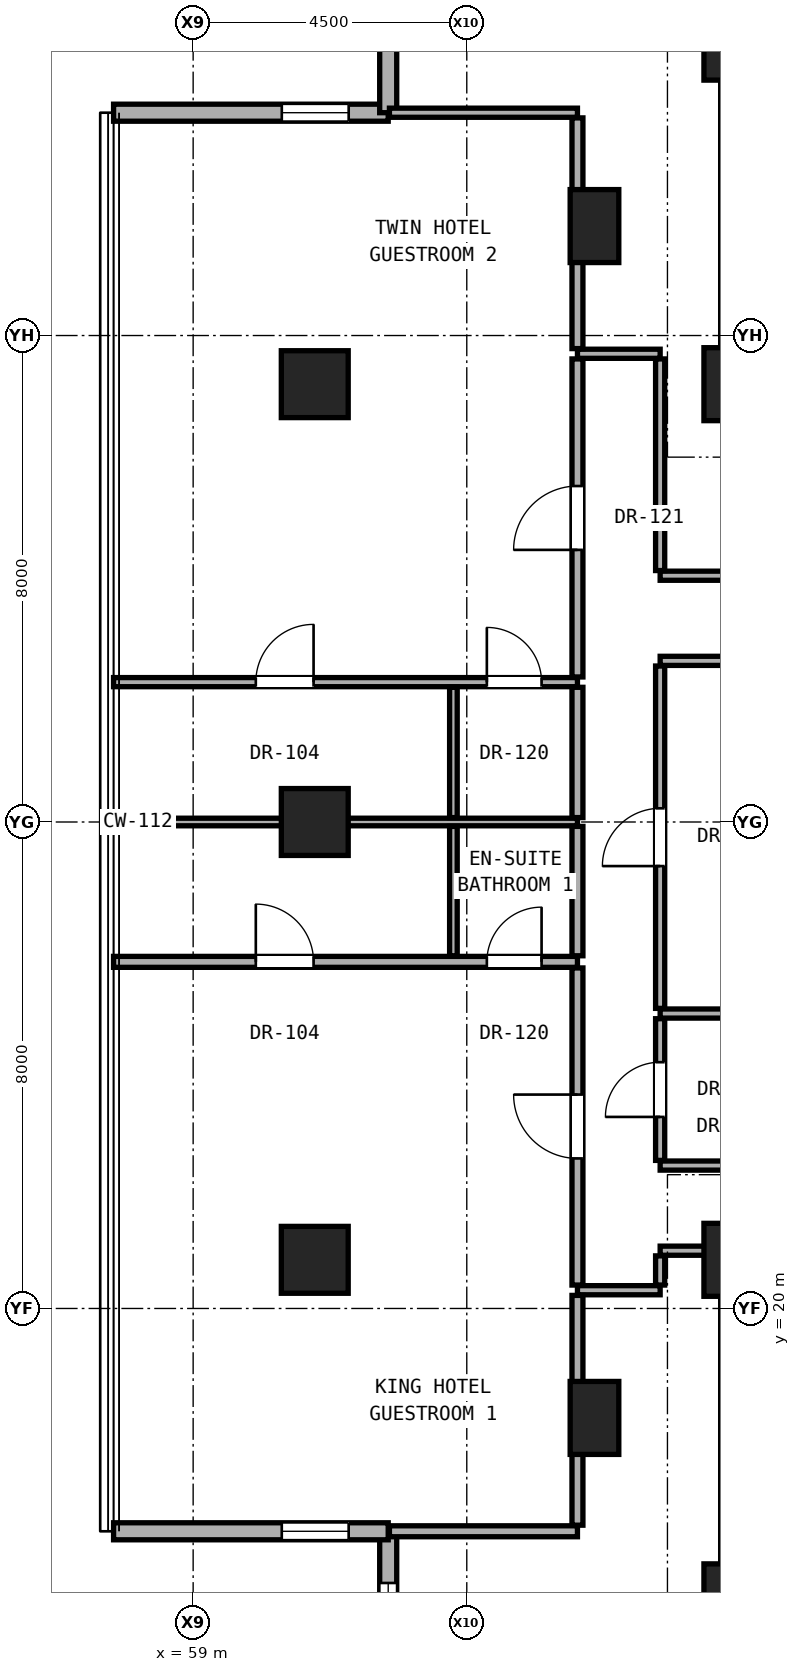
"""IFC4 building model, lengths in metres.
Left out: names, types, materials, properties, quantities, classifications, styles, units other than length and angle.
Written with IfcOpenShell. Run it as: python <this file> out.ifc"""

import sys

from ifc_helpers import new_model, si_unit, direction, frame, frame_2d, origin, origin_2d, place, context, subcontext, project, spatial, rectangle, hollow_rectangle, extrude, element, fill, save


model = new_model("IFC4")
c1 = context("Model", 3, precision=1e-05, world=origin(), true_north=direction((0.0, 1.0)))
c2 = subcontext(c1, "Body", "Model", "MODEL_VIEW")
j1 = project(units=[si_unit("LENGTHUNIT", "METRE"), si_unit("PLANEANGLEUNIT", "RADIAN")], contexts=[c1])
p1 = place(None, origin())
s1 = spatial("IfcSite", under=j1, at=p1, CompositionType="ELEMENT")
p2 = place(p1, origin())
s2 = spatial("IfcBuilding", under=s1, at=p2, CompositionType="ELEMENT")
p3 = place(p2, frame((0.0, 0.0, 111.5)))
s3 = spatial("IfcBuildingStorey", under=s2, at=p3, CompositionType="ELEMENT", Elevation=111.5)
for number, where, z_axis, x_axis in (
    (1, (68.0, 15.2, 0.0), (0.0, 0.0, 1.0), (1.0, 0.0, 0.0)),
    (2, (68.0, 20.8, 0.0), (0.0, 0.0, 1.0), (1.0, 0.0, 0.0)),
    (3, (68.0, 35.2, 0.0), (0.0, 0.0, 1.0), (1.0, 0.0, 0.0)),
    (4, (68.0, 40.8, 0.0), (0.0, 0.0, 1.0), (1.0, 0.0, 0.0)),
):
    element("IfcColumn", number, at=place(p3, frame(where, z_axis=z_axis, x_axis=x_axis)), inside=s3, PredefinedType="COLUMN", context=c2, shape_type="SweptSolid", body=[
        extrude(rectangle(XDim=1.2, YDim=1.2, at=origin_2d()), origin(), (0.0, 0.0, 1.0), 3.3),
    ])
for number, where, z_axis, x_axis in (
    (5, (61.0, 20.8, 0.0), (0.0, 0.0, 1.0), (1.0, 0.0, 0.0)),
    (6, (61.0, 28.0, 0.0), (0.0, 0.0, 1.0), (1.0, 0.0, 0.0)),
    (7, (61.0, 35.2, 0.0), (0.0, 0.0, 1.0), (1.0, 0.0, 0.0)),
):
    element("IfcColumn", number, at=place(p3, frame(where, z_axis=z_axis, x_axis=x_axis)), inside=s3, PredefinedType="COLUMN", context=c2, shape_type="SweptSolid", body=[
        extrude(hollow_rectangle(XDim=1.1, YDim=1.1, WallThickness=0.06, at=origin_2d()), origin(), (0.0, 0.0, 1.0), 3.3),
    ])
for number, where, z_axis, x_axis in (
    (8, (65.6, 18.2, 0.0), (0.0, 0.0, 1.0), (1.0, 0.0, 0.0)),
    (9, (65.6, 37.8, 0.0), (0.0, 0.0, 1.0), (1.0, 0.0, 0.0)),
):
    element("IfcColumn", number, at=place(p3, frame(where, z_axis=z_axis, x_axis=x_axis)), inside=s3, PredefinedType="PILASTER", context=c2, shape_type="SweptSolid", body=[
        extrude(rectangle(XDim=0.8, YDim=1.2, at=origin_2d()), origin(), (0.0, 0.0, 1.0), 3.3),
    ])
for number, where, z_axis, x_axis in (
    (10, (68.0, 35.2, 0.0), (0.0, 0.0, 1.0), (0.0, 1.0, 0.0)),
    (11, (68.0, 15.2, 0.0), (0.0, 0.0, 1.0), (0.0, 1.0, 0.0)),
):
    element("IfcWall", number, at=place(p3, frame(where, z_axis=z_axis, x_axis=x_axis)), inside=s3, PredefinedType="SHEAR", context=c2, shape_type="SweptSolid", body=[
        extrude(rectangle(XDim=5.6, YDim=0.65, at=frame_2d((2.8, 0.0))), origin(), (0.0, 0.0, 1.0), 3.08),
    ])
p4 = place(p3, frame((62.208, 16.336, 0.0), z_axis=(0.0, 0.0, 1.0), x_axis=(0.0, -1.0, 0.0)))
e12 = element("IfcWall", 12, at=p4, inside=s3, PredefinedType="SOLIDWALL", context=c2, shape_type="SweptSolid", body=[
    extrude(rectangle(XDim=4.516, YDim=0.28, at=frame_2d((2.258, 0.0))), origin(), (0.0, 0.0, 1.0), 3.06),
])
p5 = place(p4, frame((0.85, 0.0, 0.81)))
e13 = element("IfcOpeningElement", 13, at=p5, cuts=e12, PredefinedType="OPENING", context=c2, shape_type="SweptSolid", body=[
    extrude(rectangle(XDim=1.5, YDim=2.1, at=frame_2d((0.75, 1.05))), frame((0.0, 0.15, 0.0), z_axis=(0.0, -1.0, 0.0), x_axis=(1.0, 0.0, 0.0)), (0.0, 0.0, 1.0), 0.3),
])
p6 = place(p3, frame((57.691, 16.336, 0.0), z_axis=(0.0, 0.0, 1.0), x_axis=(1.0, 0.0, 0.0)))
e14 = element("IfcWall", 14, at=p6, inside=s3, PredefinedType="SOLIDWALL", context=c2, shape_type="SweptSolid", body=[
    extrude(rectangle(XDim=4.516, YDim=0.28, at=frame_2d((2.258, 0.0))), origin(), (0.0, 0.0, 1.0), 3.06),
])
p7 = place(p6, frame((2.766, 0.0, 0.85)))
e15 = element("IfcOpeningElement", 15, at=p7, cuts=e14, PredefinedType="OPENING", context=c2, shape_type="SweptSolid", body=[
    extrude(rectangle(XDim=1.1, YDim=2.0, at=frame_2d((0.55, 1.0))), frame((0.0, 0.15, 0.0), z_axis=(0.0, -1.0, 0.0), x_axis=(1.0, 0.0, 0.0)), (0.0, 0.0, 1.0), 0.3),
])
p8 = place(p3, frame((62.208, 39.664, 0.0), z_axis=(0.0, 0.0, 1.0), x_axis=(-1.0, 0.0, 0.0)))
e16 = element("IfcWall", 16, at=p8, inside=s3, PredefinedType="SOLIDWALL", context=c2, shape_type="SweptSolid", body=[
    extrude(rectangle(XDim=4.516, YDim=0.28, at=frame_2d((2.258, 0.0))), origin(), (0.0, 0.0, 1.0), 3.06),
])
p9 = place(p8, frame((0.65, 0.0, 0.85)))
e17 = element("IfcOpeningElement", 17, at=p9, cuts=e16, PredefinedType="OPENING", context=c2, shape_type="SweptSolid", body=[
    extrude(rectangle(XDim=1.1, YDim=2.0, at=frame_2d((0.55, 1.0))), frame((0.0, 0.15, 0.0), z_axis=(0.0, -1.0, 0.0), x_axis=(1.0, 0.0, 0.0)), (0.0, 0.0, 1.0), 0.3),
])
p10 = place(p3, frame((62.208, 44.181, 0.0), z_axis=(0.0, 0.0, 1.0), x_axis=(0.0, -1.0, 0.0)))
e18 = element("IfcWall", 18, at=p10, inside=s3, PredefinedType="SOLIDWALL", context=c2, shape_type="SweptSolid", body=[
    extrude(rectangle(XDim=4.516, YDim=0.28, at=frame_2d((2.258, 0.0))), origin(), (0.0, 0.0, 1.0), 3.06),
])
p11 = place(p3, frame((62.228, 16.336, 0.0), z_axis=(0.0, 0.0, 1.0), x_axis=(1.0, 0.0, 0.0)))
e19 = element("IfcWall", 19, at=p11, inside=s3, PredefinedType="PARTITIONING", context=c2, shape_type="SweptSolid", body=[
    extrude(rectangle(XDim=3.092, YDim=0.18, at=frame_2d((1.546, 0.0))), origin(), (0.0, 0.0, 1.0), 3.08),
])
p12 = place(p3, frame((65.32, 20.3, 0.0), z_axis=(0.0, 0.0, 1.0), x_axis=(1.0, 0.0, 0.0)))
e20 = element("IfcWall", 20, at=p12, inside=s3, PredefinedType="PARTITIONING", context=c2, shape_type="SweptSolid", body=[
    extrude(rectangle(XDim=1.36, YDim=0.15, at=frame_2d((0.68, 0.0))), origin(), (0.0, 0.0, 1.0), 3.08),
])
p13 = place(p3, frame((66.68, 20.95, 0.0), z_axis=(0.0, 0.0, 1.0), x_axis=(1.0, 0.0, 0.0)))
e21 = element("IfcWall", 21, at=p13, inside=s3, PredefinedType="PARTITIONING", context=c2, shape_type="SweptSolid", body=[
    extrude(rectangle(XDim=1.0, YDim=0.15, at=frame_2d((0.5, 0.0))), origin(), (0.0, 0.0, 1.0), 2.472),
])
p14 = place(p3, frame((66.68, 22.35, 0.0), z_axis=(0.0, 0.0, 1.0), x_axis=(1.0, 0.0, 0.0)))
e22 = element("IfcWall", 22, at=p14, inside=s3, PredefinedType="PARTITIONING", context=c2, shape_type="SweptSolid", body=[
    extrude(rectangle(XDim=19.5, YDim=0.15, at=frame_2d((9.75, 0.0))), origin(), (0.0, 0.0, 1.0), 2.145),
])
p15 = place(p14, frame((8.053, 0.0, 0.0)))
e23 = element("IfcOpeningElement", 23, at=p15, cuts=e22, PredefinedType="OPENING", context=c2, shape_type="SweptSolid", body=[
    extrude(rectangle(XDim=0.85, YDim=2.01, at=frame_2d((0.425, 1.005))), frame((0.0, 0.085, 0.0), z_axis=(0.0, -1.0, 0.0), x_axis=(1.0, 0.0, 0.0)), (0.0, 0.0, 1.0), 0.17),
])
p16 = place(p3, frame((66.68, 24.85, 0.0), z_axis=(0.0, 0.0, 1.0), x_axis=(1.0, 0.0, 0.0)))
e24 = element("IfcWall", 24, at=p16, inside=s3, PredefinedType="PARTITIONING", context=c2, shape_type="SweptSolid", body=[
    extrude(rectangle(XDim=3.07, YDim=0.15, at=frame_2d((1.535, 0.0))), origin(), (0.0, 0.0, 1.0), 2.145),
])
p17 = place(p3, frame((57.691, 25.7, 0.0), z_axis=(0.0, 0.0, 1.0), x_axis=(1.0, 0.0, 0.0)))
e25 = element("IfcWall", 25, at=p17, inside=s3, PredefinedType="PARTITIONING", context=c2, shape_type="SweptSolid", body=[
    extrude(rectangle(XDim=7.629, YDim=0.18, at=frame_2d((3.814, 0.0))), origin(), (0.0, 0.0, 1.0), 2.216),
])
p18 = place(p17, frame((2.34, 0.0, 0.0)))
e26 = element("IfcOpeningElement", 26, at=p18, cuts=e25, PredefinedType="OPENING", context=c2, shape_type="SweptSolid", body=[
    extrude(rectangle(XDim=0.95, YDim=2.15, at=frame_2d((0.475, 1.075))), frame((0.0, 0.1, 0.0), z_axis=(0.0, -1.0, 0.0), x_axis=(1.0, 0.0, 0.0)), (0.0, 0.0, 1.0), 0.2),
])
p19 = place(p17, frame((6.139, 0.0, 0.0)))
e27 = element("IfcOpeningElement", 27, at=p19, cuts=e25, PredefinedType="OPENING", context=c2, shape_type="SweptSolid", body=[
    extrude(rectangle(XDim=0.9, YDim=2.1, at=frame_2d((0.45, 1.05))), frame((0.0, 0.1, 0.0), z_axis=(0.0, -1.0, 0.0), x_axis=(1.0, 0.0, 0.0)), (0.0, 0.0, 1.0), 0.2),
])
p20 = place(p3, frame((57.691, 28.0, 0.0), z_axis=(0.0, 0.0, 1.0), x_axis=(1.0, 0.0, 0.0)))
e28 = element("IfcWall", 28, at=p20, inside=s3, PredefinedType="PARTITIONING", context=c2, shape_type="SweptSolid", body=[
    extrude(rectangle(XDim=7.629, YDim=0.125, at=frame_2d((3.814, 0.0))), origin(), (0.0, 0.0, 1.0), 2.216),
])
p21 = place(p3, frame((57.691, 30.3, 0.0), z_axis=(0.0, 0.0, 1.0), x_axis=(1.0, 0.0, 0.0)))
e29 = element("IfcWall", 29, at=p21, inside=s3, PredefinedType="PARTITIONING", context=c2, shape_type="SweptSolid", body=[
    extrude(rectangle(XDim=7.629, YDim=0.15, at=frame_2d((3.814, 0.0))), origin(), (0.0, 0.0, 1.0), 2.216),
])
p22 = place(p21, frame((2.34, 0.0, 0.0)))
e30 = element("IfcOpeningElement", 30, at=p22, cuts=e29, PredefinedType="OPENING", context=c2, shape_type="SweptSolid", body=[
    extrude(rectangle(XDim=0.95, YDim=2.15, at=frame_2d((0.475, 1.075))), frame((0.0, 0.085, 0.0), z_axis=(0.0, -1.0, 0.0), x_axis=(1.0, 0.0, 0.0)), (0.0, 0.0, 1.0), 0.17),
])
p23 = place(p21, frame((6.139, 0.0, 0.0)))
e31 = element("IfcOpeningElement", 31, at=p23, cuts=e29, PredefinedType="OPENING", context=c2, shape_type="SweptSolid", body=[
    extrude(rectangle(XDim=0.9, YDim=2.1, at=frame_2d((0.45, 1.05))), frame((0.0, 0.085, 0.0), z_axis=(0.0, -1.0, 0.0), x_axis=(1.0, 0.0, 0.0)), (0.0, 0.0, 1.0), 0.17),
])
p24 = place(p3, frame((66.68, 30.65, 0.0), z_axis=(0.0, 0.0, 1.0), x_axis=(1.0, 0.0, 0.0)))
e32 = element("IfcWall", 32, at=p24, inside=s3, PredefinedType="PARTITIONING", context=c2, shape_type="SweptSolid", body=[
    extrude(rectangle(XDim=19.5, YDim=0.15, at=frame_2d((9.75, 0.0))), origin(), (0.0, 0.0, 1.0), 2.145),
])
p25 = place(p24, frame((3.795, 0.0, 0.0)))
e33 = element("IfcOpeningElement", 33, at=p25, cuts=e32, PredefinedType="OPENING", context=c2, shape_type="SweptSolid", body=[
    extrude(rectangle(XDim=0.85, YDim=2.01, at=frame_2d((0.425, 1.005))), frame((0.0, 0.085, 0.0), z_axis=(0.0, -1.0, 0.0), x_axis=(1.0, 0.0, 0.0)), (0.0, 0.0, 1.0), 0.17),
])
p26 = place(p24, frame((15.098, 0.0, 0.0)))
e34 = element("IfcOpeningElement", 34, at=p26, cuts=e32, PredefinedType="OPENING", context=c2, shape_type="SweptSolid", body=[
    extrude(rectangle(XDim=0.85, YDim=2.01, at=frame_2d((0.425, 1.005))), frame((0.0, 0.085, 0.0), z_axis=(0.0, -1.0, 0.0), x_axis=(1.0, 0.0, 0.0)), (0.0, 0.0, 1.0), 0.17),
])
p27 = place(p3, frame((66.68, 32.05, 0.0), z_axis=(0.0, 0.0, 1.0), x_axis=(1.0, 0.0, 0.0)))
e35 = element("IfcWall", 35, at=p27, inside=s3, PredefinedType="PARTITIONING", context=c2, shape_type="SweptSolid", body=[
    extrude(rectangle(XDim=2.12, YDim=0.15, at=frame_2d((1.06, 0.0))), origin(), (0.0, 0.0, 1.0), 2.145),
])
p28 = place(p3, frame((65.32, 35.7, 0.0), z_axis=(0.0, 0.0, 1.0), x_axis=(1.0, 0.0, 0.0)))
e36 = element("IfcWall", 36, at=p28, inside=s3, PredefinedType="PARTITIONING", context=c2, shape_type="SweptSolid", body=[
    extrude(rectangle(XDim=1.36, YDim=0.15, at=frame_2d((0.68, 0.0))), origin(), (0.0, 0.0, 1.0), 3.08),
])
p29 = place(p3, frame((62.228, 39.664, 0.0), z_axis=(0.0, 0.0, 1.0), x_axis=(1.0, 0.0, 0.0)))
e37 = element("IfcWall", 37, at=p29, inside=s3, PredefinedType="PARTITIONING", context=c2, shape_type="SweptSolid", body=[
    extrude(rectangle(XDim=3.092, YDim=0.15, at=frame_2d((1.546, 0.0))), origin(), (0.0, 0.0, 1.0), 3.08),
])
p30 = place(p3, frame((63.28, 25.8, 0.0), z_axis=(0.0, 0.0, 1.0), x_axis=(0.0, 1.0, 0.0)))
e38 = element("IfcWall", 38, at=p30, inside=s3, PredefinedType="PARTITIONING", context=c2, shape_type="SweptSolid", body=[
    extrude(rectangle(XDim=2.127, YDim=0.125, at=frame_2d((1.064, 0.0))), origin(), (0.0, 0.0, 1.0), 2.299),
])
p31 = place(p3, frame((63.28, 28.073, 0.0), z_axis=(0.0, 0.0, 1.0), x_axis=(0.0, 1.0, 0.0)))
e39 = element("IfcWall", 39, at=p31, inside=s3, PredefinedType="PARTITIONING", context=c2, shape_type="SweptSolid", body=[
    extrude(rectangle(XDim=2.143, YDim=0.125, at=frame_2d((1.071, 0.0))), origin(), (0.0, 0.0, 1.0), 2.299),
])
p32 = place(p3, frame((65.32, 16.436, 0.0), z_axis=(0.0, 0.0, 1.0), x_axis=(0.0, 1.0, 0.0)))
e40 = element("IfcWall", 40, at=p32, inside=s3, PredefinedType="PARTITIONING", context=c2, shape_type="SweptSolid", body=[
    extrude(rectangle(XDim=3.779, YDim=0.18, at=frame_2d((1.89, 0.0))), origin(), (0.0, 0.0, 1.0), 2.456),
])
p33 = place(p3, frame((65.32, 20.385, 0.0), z_axis=(0.0, 0.0, 1.0), x_axis=(0.0, 1.0, 0.0)))
e41 = element("IfcWall", 41, at=p33, inside=s3, PredefinedType="PARTITIONING", context=c2, shape_type="SweptSolid", body=[
    extrude(rectangle(XDim=5.215, YDim=0.18, at=frame_2d((2.607, 0.0))), origin(), (0.0, 0.0, 1.0), 2.472),
])
p34 = place(p33, frame((2.083, 0.0, 0.0)))
e42 = element("IfcOpeningElement", 42, at=p34, cuts=e41, PredefinedType="OPENING", context=c2, shape_type="SweptSolid", body=[
    extrude(rectangle(XDim=1.05, YDim=2.2, at=frame_2d((0.525, 1.1))), frame((0.0, 0.1, 0.0), z_axis=(0.0, -1.0, 0.0), x_axis=(1.0, 0.0, 0.0)), (0.0, 0.0, 1.0), 0.2),
])
p35 = place(p3, frame((65.32, 25.8, 0.0), z_axis=(0.0, 0.0, 1.0), x_axis=(0.0, 1.0, 0.0)))
e43 = element("IfcWall", 43, at=p35, inside=s3, PredefinedType="PARTITIONING", context=c2, shape_type="SweptSolid", body=[
    extrude(rectangle(XDim=2.127, YDim=0.18, at=frame_2d((1.064, 0.0))), origin(), (0.0, 0.0, 1.0), 2.299),
])
p36 = place(p3, frame((65.32, 28.073, 0.0), z_axis=(0.0, 0.0, 1.0), x_axis=(0.0, 1.0, 0.0)))
e44 = element("IfcWall", 44, at=p36, inside=s3, PredefinedType="PARTITIONING", context=c2, shape_type="SweptSolid", body=[
    extrude(rectangle(XDim=2.143, YDim=0.18, at=frame_2d((1.071, 0.0))), origin(), (0.0, 0.0, 1.0), 2.299),
])
p37 = place(p3, frame((65.32, 30.385, 0.0), z_axis=(0.0, 0.0, 1.0), x_axis=(0.0, 1.0, 0.0)))
e45 = element("IfcWall", 45, at=p37, inside=s3, PredefinedType="PARTITIONING", context=c2, shape_type="SweptSolid", body=[
    extrude(rectangle(XDim=5.23, YDim=0.18, at=frame_2d((2.615, 0.0))), origin(), (0.0, 0.0, 1.0), 2.472),
])
p38 = place(p37, frame((2.09, 0.0, 0.0)))
e46 = element("IfcOpeningElement", 46, at=p38, cuts=e45, PredefinedType="OPENING", context=c2, shape_type="SweptSolid", body=[
    extrude(rectangle(XDim=1.05, YDim=2.2, at=frame_2d((0.525, 1.1))), frame((0.0, 0.1, 0.0), z_axis=(0.0, -1.0, 0.0), x_axis=(1.0, 0.0, 0.0)), (0.0, 0.0, 1.0), 0.2),
])
p39 = place(p3, frame((65.32, 35.785, 0.0), z_axis=(0.0, 0.0, 1.0), x_axis=(0.0, 1.0, 0.0)))
e47 = element("IfcWall", 47, at=p39, inside=s3, PredefinedType="PARTITIONING", context=c2, shape_type="SweptSolid", body=[
    extrude(rectangle(XDim=3.794, YDim=0.18, at=frame_2d((1.897, 0.0))), origin(), (0.0, 0.0, 1.0), 2.456),
])
p40 = place(p3, frame((66.68, 20.385, 0.0), z_axis=(0.0, 0.0, 1.0), x_axis=(0.0, 1.0, 0.0)))
e48 = element("IfcWall", 48, at=p40, inside=s3, PredefinedType="PARTITIONING", context=c2, shape_type="SweptSolid", body=[
    extrude(rectangle(XDim=0.48, YDim=0.15, at=frame_2d((0.24, 0.0))), origin(), (0.0, 0.0, 1.0), 2.472),
])
p41 = place(p3, frame((66.68, 22.435, 0.0), z_axis=(0.0, 0.0, 1.0), x_axis=(0.0, 1.0, 0.0)))
e49 = element("IfcWall", 49, at=p41, inside=s3, PredefinedType="PARTITIONING", context=c2, shape_type="SweptSolid", body=[
    extrude(rectangle(XDim=2.33, YDim=0.15, at=frame_2d((1.165, 0.0))), origin(), (0.0, 0.0, 1.0), 3.08),
])
p42 = place(p41, frame((0.715, 0.0, 0.0)))
e50 = element("IfcOpeningElement", 50, at=p42, cuts=e49, PredefinedType="OPENING", context=c2, shape_type="SweptSolid", body=[
    extrude(rectangle(XDim=0.9, YDim=2.1, at=frame_2d((0.45, 1.05))), frame((0.0, 0.085, 0.0), z_axis=(0.0, -1.0, 0.0), x_axis=(1.0, 0.0, 0.0)), (0.0, 0.0, 1.0), 0.17),
])
p43 = place(p3, frame((66.68, 24.935, 0.0), z_axis=(0.0, 0.0, 1.0), x_axis=(0.0, 1.0, 0.0)))
e51 = element("IfcWall", 51, at=p43, inside=s3, PredefinedType="PARTITIONING", context=c2, shape_type="SweptSolid", body=[
    extrude(rectangle(XDim=5.63, YDim=0.15, at=frame_2d((2.815, 0.0))), origin(), (0.0, 0.0, 1.0), 2.299),
])
p44 = place(p43, frame((2.34, 0.0, 0.0)))
e52 = element("IfcOpeningElement", 52, at=p44, cuts=e51, PredefinedType="OPENING", context=c2, shape_type="SweptSolid", body=[
    extrude(rectangle(XDim=0.95, YDim=2.15, at=frame_2d((0.475, 1.075))), frame((0.0, 0.085, 0.0), z_axis=(0.0, -1.0, 0.0), x_axis=(1.0, 0.0, 0.0)), (0.0, 0.0, 1.0), 0.17),
])
p45 = place(p3, frame((66.68, 32.135, 0.0), z_axis=(0.0, 0.0, 1.0), x_axis=(0.0, 1.0, 0.0)))
e53 = element("IfcWall", 53, at=p45, inside=s3, PredefinedType="PARTITIONING", context=c2, shape_type="SweptSolid", body=[
    extrude(rectangle(XDim=3.48, YDim=0.15, at=frame_2d((1.74, 0.0))), origin(), (0.0, 0.0, 1.0), 2.472),
])
p46 = place(p5, origin())
e54 = element("IfcWindow", 54, at=p46, inside=s3, PartitioningType="SINGLE_PANEL", PredefinedType="WINDOW", context=c2, shape_type="SweptSolid", body=[
    extrude(rectangle(XDim=1.5, YDim=2.1, at=frame_2d((0.75, 1.05))), frame((0.0, 0.03, 0.0), z_axis=(0.0, -1.0, 0.0), x_axis=(1.0, 0.0, 0.0)), (0.0, 0.0, 1.0), 0.06),
])
fill(e13, e54)
p47 = place(p7, origin())
e55 = element("IfcWindow", 55, at=p47, inside=s3, PartitioningType="SINGLE_PANEL", PredefinedType="WINDOW", context=c2, shape_type="SweptSolid", body=[
    extrude(rectangle(XDim=1.1, YDim=2.0, at=frame_2d((0.55, 1.0))), frame((0.0, 0.03, 0.0), z_axis=(0.0, -1.0, 0.0), x_axis=(1.0, 0.0, 0.0)), (0.0, 0.0, 1.0), 0.06),
])
fill(e15, e55)
p48 = place(p9, origin())
e56 = element("IfcWindow", 56, at=p48, inside=s3, PartitioningType="SINGLE_PANEL", PredefinedType="WINDOW", context=c2, shape_type="SweptSolid", body=[
    extrude(rectangle(XDim=1.1, YDim=2.0, at=frame_2d((0.55, 1.0))), frame((0.0, 0.03, 0.0), z_axis=(0.0, -1.0, 0.0), x_axis=(1.0, 0.0, 0.0)), (0.0, 0.0, 1.0), 0.06),
])
fill(e17, e56)
p49 = place(p42, origin())
e57 = element("IfcDoor", 57, at=p49, inside=s3, OperationType="SINGLE_SWING_LEFT", PredefinedType="DOOR", context=c2, shape_type="SweptSolid", body=[
    extrude(rectangle(XDim=0.9, YDim=2.1, at=frame_2d((0.45, 1.05))), frame((0.0, 0.025, 0.0), z_axis=(0.0, -1.0, 0.0), x_axis=(1.0, 0.0, 0.0)), (0.0, 0.0, 1.0), 0.05),
])
fill(e50, e57)
p50 = place(p34, origin())
e58 = element("IfcDoor", 58, at=p50, inside=s3, OperationType="SINGLE_SWING_RIGHT", PredefinedType="DOOR", context=c2, shape_type="SweptSolid", body=[
    extrude(rectangle(XDim=1.05, YDim=2.2, at=frame_2d((0.525, 1.1))), frame((0.0, 0.025, 0.0), z_axis=(0.0, -1.0, 0.0), x_axis=(1.0, 0.0, 0.0)), (0.0, 0.0, 1.0), 0.05),
])
fill(e42, e58)
p51 = place(p18, origin())
e59 = element("IfcDoor", 59, at=p51, inside=s3, OperationType="SINGLE_SWING_LEFT", PredefinedType="DOOR", context=c2, shape_type="SweptSolid", body=[
    extrude(rectangle(XDim=0.95, YDim=2.15, at=frame_2d((0.475, 1.075))), frame((0.0, 0.025, 0.0), z_axis=(0.0, -1.0, 0.0), x_axis=(1.0, 0.0, 0.0)), (0.0, 0.0, 1.0), 0.05),
])
fill(e26, e59)
p52 = place(p19, origin())
e60 = element("IfcDoor", 60, at=p52, inside=s3, OperationType="SINGLE_SWING_RIGHT", PredefinedType="DOOR", context=c2, shape_type="SweptSolid", body=[
    extrude(rectangle(XDim=0.9, YDim=2.1, at=frame_2d((0.45, 1.05))), frame((0.0, 0.025, 0.0), z_axis=(0.0, -1.0, 0.0), x_axis=(1.0, 0.0, 0.0)), (0.0, 0.0, 1.0), 0.05),
])
fill(e27, e60)
p53 = place(p38, origin())
e61 = element("IfcDoor", 61, at=p53, inside=s3, OperationType="SINGLE_SWING_LEFT", PredefinedType="DOOR", context=c2, shape_type="SweptSolid", body=[
    extrude(rectangle(XDim=1.05, YDim=2.2, at=frame_2d((0.525, 1.1))), frame((0.0, 0.025, 0.0), z_axis=(0.0, -1.0, 0.0), x_axis=(1.0, 0.0, 0.0)), (0.0, 0.0, 1.0), 0.05),
])
fill(e46, e61)
p54 = place(p22, origin())
e62 = element("IfcDoor", 62, at=p54, inside=s3, OperationType="SINGLE_SWING_RIGHT", PredefinedType="DOOR", context=c2, shape_type="SweptSolid", body=[
    extrude(rectangle(XDim=0.95, YDim=2.15, at=frame_2d((0.475, 1.075))), frame((0.0, 0.025, 0.0), z_axis=(0.0, -1.0, 0.0), x_axis=(1.0, 0.0, 0.0)), (0.0, 0.0, 1.0), 0.05),
])
fill(e30, e62)
p55 = place(p23, origin())
e63 = element("IfcDoor", 63, at=p55, inside=s3, OperationType="SINGLE_SWING_LEFT", PredefinedType="DOOR", context=c2, shape_type="SweptSolid", body=[
    extrude(rectangle(XDim=0.9, YDim=2.1, at=frame_2d((0.45, 1.05))), frame((0.0, 0.025, 0.0), z_axis=(0.0, -1.0, 0.0), x_axis=(1.0, 0.0, 0.0)), (0.0, 0.0, 1.0), 0.05),
])
fill(e31, e63)
p56 = place(p44, origin())
e64 = element("IfcDoor", 64, at=p56, inside=s3, OperationType="SINGLE_SWING_LEFT", PredefinedType="DOOR", context=c2, shape_type="SweptSolid", body=[
    extrude(rectangle(XDim=0.95, YDim=2.15, at=frame_2d((0.475, 1.075))), frame((0.0, 0.025, 0.0), z_axis=(0.0, -1.0, 0.0), x_axis=(1.0, 0.0, 0.0)), (0.0, 0.0, 1.0), 0.05),
])
fill(e52, e64)
save(model, sys.argv[1])
